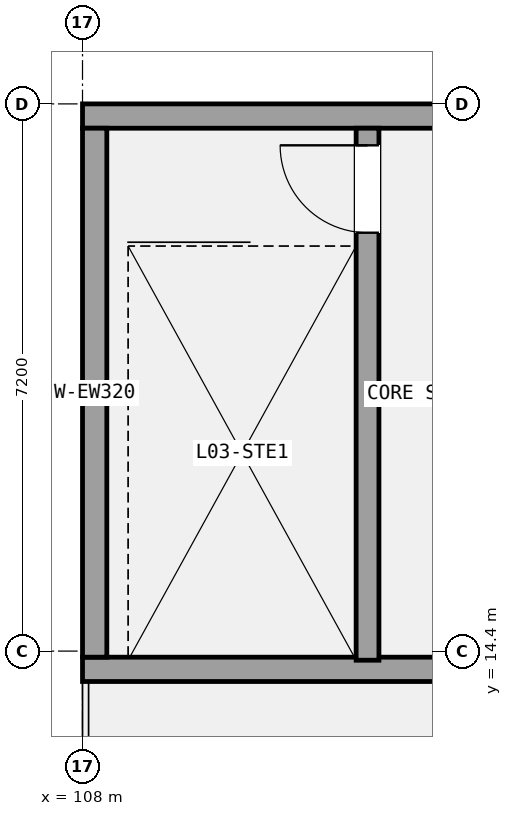
"""IFC4 building model, lengths in metres.
Left out: names, types, materials, properties, quantities, classifications, styles, units other than length and angle.
Written with IfcOpenShell. Run it as: python <this file> out.ifc"""

import sys

from ifc_helpers import new_model, si_unit, direction, frame, frame_2d, origin, place, context, subcontext, project, spatial, rectangle, extrude, element, fill, save


model = new_model("IFC4")
c1 = context("Model", 3, precision=1e-05, world=origin(), true_north=direction((0.0, 1.0)))
c2 = subcontext(c1, "Body", "Model", "MODEL_VIEW")
j1 = project(units=[si_unit("LENGTHUNIT", "METRE"), si_unit("PLANEANGLEUNIT", "RADIAN")], contexts=[c1])
p1 = place(None, origin())
s1 = spatial("IfcSite", under=j1, at=p1, CompositionType="ELEMENT")
p2 = place(p1, origin())
s2 = spatial("IfcBuilding", under=s1, at=p2, CompositionType="ELEMENT")
p3 = place(p2, frame((0.0, 0.0, 12.075)))
s3 = spatial("IfcBuildingStorey", under=s2, at=p3, CompositionType="ELEMENT", Elevation=12.075)
p4 = place(p3, frame((108.0, 14.16, 0.0), z_axis=(0.0, 0.0, 1.0), x_axis=(1.0, 0.0, 0.0)))
e1 = element("IfcWall", 1, at=p4, inside=s3, PredefinedType="SOLIDWALL", context=c2, shape_type="SweptSolid", body=[
    extrude(rectangle(XDim=28.8, YDim=0.32, at=frame_2d((14.4, 0.0))), origin(), (0.0, 0.0, 1.0), 3.15),
])
p5 = place(p4, frame((10.8, 0.0, 0.0)))
e2 = element("IfcOpeningElement", 2, at=p5, cuts=e1, PredefinedType="OPENING", context=c2, shape_type="SweptSolid", body=[
    extrude(rectangle(XDim=1.35, YDim=2.2, at=frame_2d((0.675, 1.1))), frame((0.0, 0.17, 0.0), z_axis=(0.0, -1.0, 0.0), x_axis=(1.0, 0.0, 0.0)), (0.0, 0.0, 1.0), 0.34),
])
p6 = place(p3, frame((108.0, 21.44, 0.0), z_axis=(0.0, 0.0, 1.0), x_axis=(1.0, 0.0, 0.0)))
e3 = element("IfcWall", 3, at=p6, inside=s3, PredefinedType="SOLIDWALL", context=c2, shape_type="SweptSolid", body=[
    extrude(rectangle(XDim=28.8, YDim=0.32, at=frame_2d((14.4, 0.0))), origin(), (0.0, 0.0, 1.0), 3.15),
])
p7 = place(p3, frame((108.16, 14.32, 0.0), z_axis=(0.0, 0.0, 1.0), x_axis=(0.0, 1.0, 0.0)))
e4 = element("IfcWall", 4, at=p7, inside=s3, PredefinedType="SOLIDWALL", context=c2, shape_type="SweptSolid", body=[
    extrude(rectangle(XDim=6.96, YDim=0.32, at=frame_2d((3.48, 0.0))), origin(), (0.0, 0.0, 1.0), 3.15),
])
p8 = place(p3, frame((111.75, 14.28, 0.0), z_axis=(0.0, 0.0, 1.0), x_axis=(0.0, 1.0, 0.0)))
e5 = element("IfcWall", 5, at=p8, inside=s3, PredefinedType="SHEAR", context=c2, shape_type="SweptSolid", body=[
    extrude(rectangle(XDim=7.0, YDim=0.3, at=frame_2d((3.5, 0.0))), origin(), (0.0, 0.0, 1.0), 3.15),
])
p9 = place(p8, frame((5.625, 0.0, 0.0)))
e6 = element("IfcOpeningElement", 6, at=p9, cuts=e5, PredefinedType="OPENING", context=c2, shape_type="SweptSolid", body=[
    extrude(rectangle(XDim=1.15, YDim=2.12, at=frame_2d((0.575, 1.06))), frame((0.0, 0.16, 0.0), z_axis=(0.0, -1.0, 0.0), x_axis=(1.0, 0.0, 0.0)), (0.0, 0.0, 1.0), 0.32),
])
p10 = place(p9, origin())
e7 = element("IfcDoor", 7, at=p10, inside=s3, OperationType="SINGLE_SWING_RIGHT", PredefinedType="DOOR", context=c2, shape_type="SweptSolid", body=[
    extrude(rectangle(XDim=1.15, YDim=2.12, at=frame_2d((0.575, 1.06))), frame((0.0, 0.025, 0.0), z_axis=(0.0, -1.0, 0.0), x_axis=(1.0, 0.0, 0.0)), (0.0, 0.0, 1.0), 0.05),
])
fill(e6, e7)
save(model, sys.argv[1])
